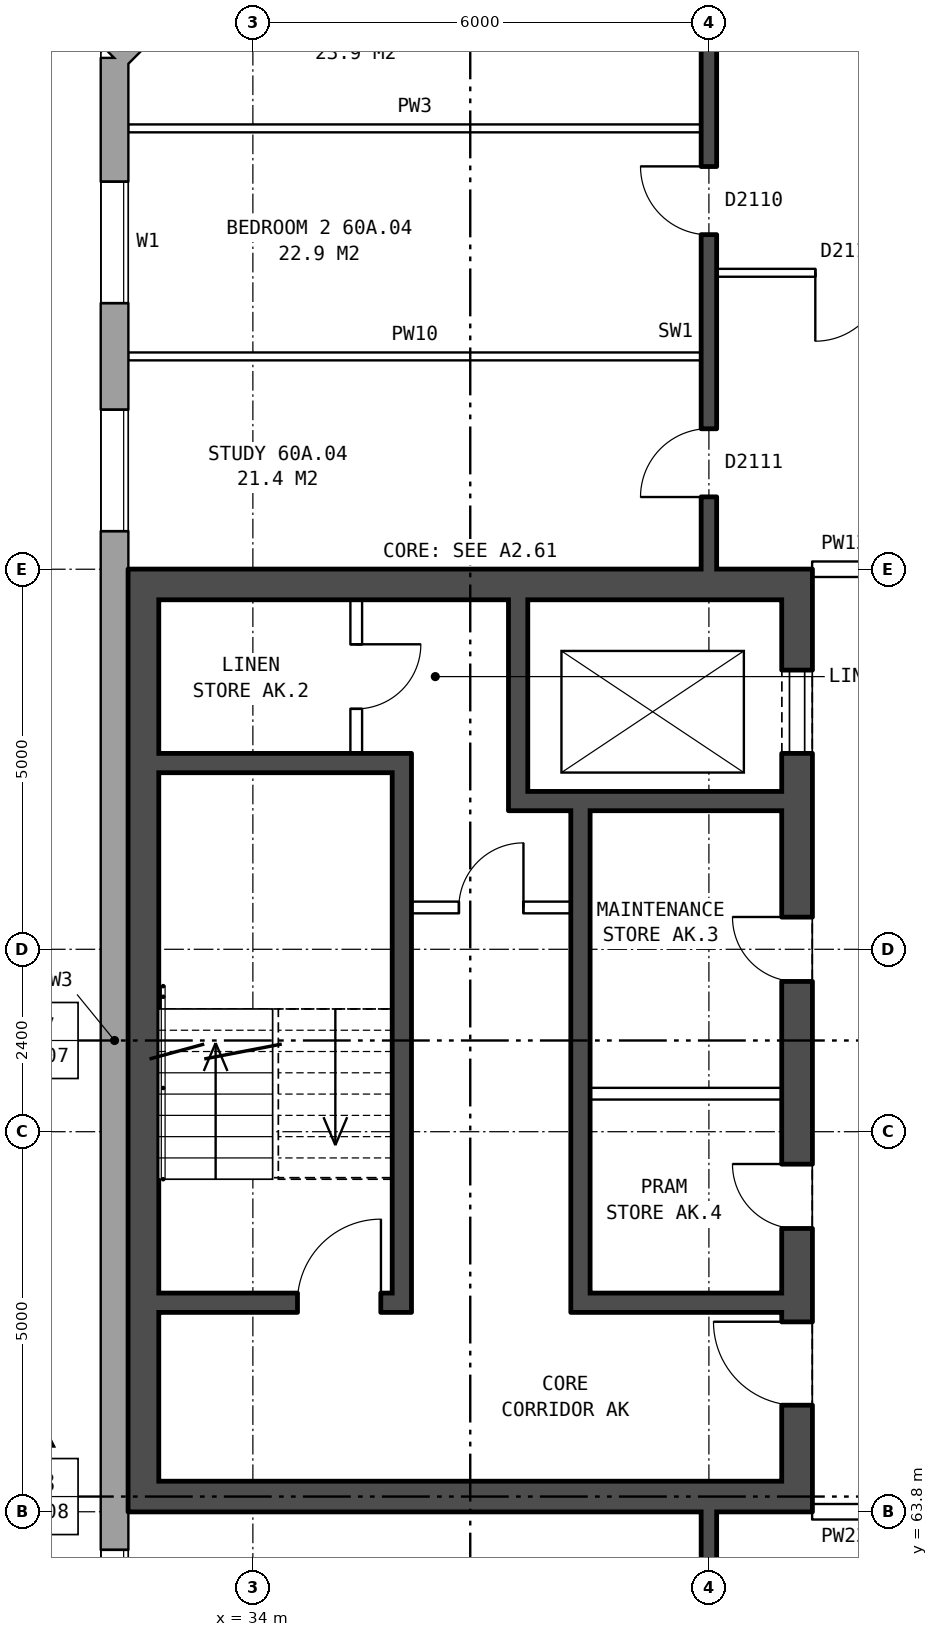
"""IFC4 building model, lengths in metres.
Left out: names, types, materials, properties, quantities, classifications, styles, units other than length and angle.
Written with IfcOpenShell. Run it as: python <this file> out.ifc"""

import sys

from ifc_helpers import new_model, si_unit, direction, frame, frame_2d, origin, place, context, subcontext, project, spatial, rectangle, extrude, element, fill, save


model = new_model("IFC4")
c1 = context("Model", 3, precision=1e-05, world=origin(), true_north=direction((0.0, 1.0)))
c2 = subcontext(c1, "Body", "Model", "MODEL_VIEW")
j1 = project(units=[si_unit("LENGTHUNIT", "METRE"), si_unit("PLANEANGLEUNIT", "RADIAN")], contexts=[c1])
p1 = place(None, origin())
s1 = spatial("IfcSite", under=j1, at=p1, CompositionType="ELEMENT")
p2 = place(p1, origin())
s2 = spatial("IfcBuilding", under=s1, at=p2, CompositionType="ELEMENT")
p3 = place(p2, frame((0.0, 0.0, 212.1)))
s3 = spatial("IfcBuildingStorey", under=s2, at=p3, CompositionType="ELEMENT", Elevation=212.1)
p4 = place(p3, frame((35.075, 85.82, 0.0), z_axis=(0.0, 0.0, 1.0), x_axis=(-0.707106781187, -0.707106781187, 0.0)))
e1 = element("IfcWall", 1, at=p4, inside=s3, PredefinedType="STANDARD", context=c2, shape_type="SweptSolid", body=[
    extrude(rectangle(XDim=4.094, YDim=0.36, at=frame_2d((2.047, 0.0))), origin(), (0.0, 0.0, 1.0), 2.85),
])
p5 = place(p4, frame((1.247, 0.0, 0.8)))
e2 = element("IfcOpeningElement", 2, at=p5, cuts=e1, PredefinedType="OPENING", context=c2, shape_type="SweptSolid", body=[
    extrude(rectangle(XDim=1.6, YDim=1.8, at=frame_2d((0.8, 0.9))), frame((0.0, 0.19, 0.0), z_axis=(0.0, -1.0, 0.0), x_axis=(1.0, 0.0, 0.0)), (0.0, 0.0, 1.0), 0.38),
])
p6 = place(p3, frame((32.18, 82.925, 0.0), z_axis=(0.0, 0.0, 1.0), x_axis=(0.0, -1.0, 0.0)))
e3 = element("IfcWall", 3, at=p6, inside=s3, PredefinedType="STANDARD", context=c2, shape_type="SweptSolid", body=[
    extrude(rectangle(XDim=25.851, YDim=0.36, at=frame_2d((12.925, 0.0))), origin(), (0.0, 0.0, 1.0), 2.85),
])
p7 = place(p6, frame((1.625, 0.0, 0.8)))
e4 = element("IfcOpeningElement", 4, at=p7, cuts=e3, PredefinedType="OPENING", context=c2, shape_type="SweptSolid", body=[
    extrude(rectangle(XDim=1.6, YDim=1.8, at=frame_2d((0.8, 0.9))), frame((0.0, 0.19, 0.0), z_axis=(0.0, -1.0, 0.0), x_axis=(1.0, 0.0, 0.0)), (0.0, 0.0, 1.0), 0.38),
])
p8 = place(p6, frame((4.625, 0.0, 0.8)))
e5 = element("IfcOpeningElement", 5, at=p8, cuts=e3, PredefinedType="OPENING", context=c2, shape_type="SweptSolid", body=[
    extrude(rectangle(XDim=1.6, YDim=1.8, at=frame_2d((0.8, 0.9))), frame((0.0, 0.19, 0.0), z_axis=(0.0, -1.0, 0.0), x_axis=(1.0, 0.0, 0.0)), (0.0, 0.0, 1.0), 0.38),
])
p9 = place(p6, frame((19.625, 0.0, 0.8)))
e6 = element("IfcOpeningElement", 6, at=p9, cuts=e3, PredefinedType="OPENING", context=c2, shape_type="SweptSolid", body=[
    extrude(rectangle(XDim=1.6, YDim=1.8, at=frame_2d((0.8, 0.9))), frame((0.0, 0.19, 0.0), z_axis=(0.0, -1.0, 0.0), x_axis=(1.0, 0.0, 0.0)), (0.0, 0.0, 1.0), 0.38),
])
p10 = place(p6, frame((22.625, 0.0, 0.8)))
e7 = element("IfcOpeningElement", 7, at=p10, cuts=e3, PredefinedType="OPENING", context=c2, shape_type="SweptSolid", body=[
    extrude(rectangle(XDim=1.6, YDim=1.8, at=frame_2d((0.8, 0.9))), frame((0.0, 0.19, 0.0), z_axis=(0.0, -1.0, 0.0), x_axis=(1.0, 0.0, 0.0)), (0.0, 0.0, 1.0), 0.38),
])
p11 = place(p3, frame((41.16, 76.2, 0.0), z_axis=(0.0, 0.0, 1.0), x_axis=(0.0, -1.0, 0.0)))
e8 = element("IfcWall", 8, at=p11, inside=s3, PredefinedType="SHEAR", context=c2, shape_type="SweptSolid", body=[
    extrude(rectangle(XDim=12.4, YDim=0.4, at=frame_2d((6.2, 0.0))), origin(), (0.0, 0.0, 1.0), 2.85),
])
p12 = place(p11, frame((1.325, 0.0, 0.0)))
e9 = element("IfcOpeningElement", 9, at=p12, cuts=e8, PredefinedType="OPENING", context=c2, shape_type="SweptSolid", body=[
    extrude(rectangle(XDim=1.1, YDim=2.1, at=frame_2d((0.55, 1.05))), frame((0.0, 0.21, 0.0), z_axis=(0.0, -1.0, 0.0), x_axis=(1.0, 0.0, 0.0)), (0.0, 0.0, 1.0), 0.42),
])
p13 = place(p11, frame((4.575, 0.0, 0.0)))
e10 = element("IfcOpeningElement", 10, at=p13, cuts=e8, PredefinedType="OPENING", context=c2, shape_type="SweptSolid", body=[
    extrude(rectangle(XDim=0.85, YDim=2.1, at=frame_2d((0.425, 1.05))), frame((0.0, 0.21, 0.0), z_axis=(0.0, -1.0, 0.0), x_axis=(1.0, 0.0, 0.0)), (0.0, 0.0, 1.0), 0.42),
])
p14 = place(p11, frame((7.825, 0.0, 0.0)))
e11 = element("IfcOpeningElement", 11, at=p14, cuts=e8, PredefinedType="OPENING", context=c2, shape_type="SweptSolid", body=[
    extrude(rectangle(XDim=0.85, YDim=2.1, at=frame_2d((0.425, 1.05))), frame((0.0, 0.21, 0.0), z_axis=(0.0, -1.0, 0.0), x_axis=(1.0, 0.0, 0.0)), (0.0, 0.0, 1.0), 0.42),
])
p15 = place(p11, frame((9.9, 0.0, 0.0)))
e12 = element("IfcOpeningElement", 12, at=p15, cuts=e8, PredefinedType="OPENING", context=c2, shape_type="SweptSolid", body=[
    extrude(rectangle(XDim=1.1, YDim=2.1, at=frame_2d((0.55, 1.05))), frame((0.0, 0.21, 0.0), z_axis=(0.0, -1.0, 0.0), x_axis=(1.0, 0.0, 0.0)), (0.0, 0.0, 1.0), 0.42),
])
p16 = place(p3, frame((32.56, 76.2, 0.0), z_axis=(0.0, 0.0, 1.0), x_axis=(0.0, -1.0, 0.0)))
e13 = element("IfcWall", 13, at=p16, inside=s3, PredefinedType="SHEAR", context=c2, shape_type="SweptSolid", body=[
    extrude(rectangle(XDim=12.4, YDim=0.4, at=frame_2d((6.2, 0.0))), origin(), (0.0, 0.0, 1.0), 2.85),
])
for number, where, z_axis, x_axis in (
    (14, (40.96, 76.0, 0.0), (0.0, 0.0, 1.0), (-1.0, 0.0, 0.0)),
    (15, (40.96, 64.0, 0.0), (0.0, 0.0, 1.0), (-1.0, 0.0, 0.0)),
):
    element("IfcWall", number, at=place(p3, frame(where, z_axis=z_axis, x_axis=x_axis)), inside=s3, PredefinedType="SHEAR", context=c2, shape_type="SweptSolid", body=[
        extrude(rectangle(XDim=8.2, YDim=0.4, at=frame_2d((4.1, 0.0))), origin(), (0.0, 0.0, 1.0), 2.85),
    ])
p17 = place(p3, frame((35.835, 73.65, 0.0), z_axis=(0.0, 0.0, 1.0), x_axis=(-1.0, 0.0, 0.0)))
e16 = element("IfcWall", 16, at=p17, inside=s3, PredefinedType="SHEAR", context=c2, shape_type="SweptSolid", body=[
    extrude(rectangle(XDim=3.075, YDim=0.25, at=frame_2d((1.538, 0.0))), origin(), (0.0, 0.0, 1.0), 2.85),
])
p18 = place(p3, frame((40.96, 73.15, 0.0), z_axis=(0.0, 0.0, 1.0), x_axis=(-1.0, 0.0, 0.0)))
e17 = element("IfcWall", 17, at=p18, inside=s3, PredefinedType="SHEAR", context=c2, shape_type="SweptSolid", body=[
    extrude(rectangle(XDim=3.595, YDim=0.25, at=frame_2d((1.797, 0.0))), origin(), (0.0, 0.0, 1.0), 2.85),
])
p19 = place(p3, frame((38.185, 71.75, 0.0), z_axis=(0.0, 0.0, 1.0), x_axis=(-1.0, 0.0, 0.0)))
e18 = element("IfcWall", 18, at=p19, inside=s3, PredefinedType="PARTITIONING", context=c2, shape_type="SweptSolid", body=[
    extrude(rectangle(XDim=2.1, YDim=0.15, at=frame_2d((1.05, 0.0))), origin(), (0.0, 0.0, 1.0), 2.85),
])
p20 = place(p19, frame((0.625, 0.0, 0.0)))
e19 = element("IfcOpeningElement", 19, at=p20, cuts=e18, PredefinedType="OPENING", context=c2, shape_type="SweptSolid", body=[
    extrude(rectangle(XDim=0.85, YDim=2.1, at=frame_2d((0.425, 1.05))), frame((0.0, 0.085, 0.0), z_axis=(0.0, -1.0, 0.0), x_axis=(1.0, 0.0, 0.0)), (0.0, 0.0, 1.0), 0.17),
])
p21 = place(p3, frame((40.96, 69.3, 0.0), z_axis=(0.0, 0.0, 1.0), x_axis=(-1.0, 0.0, 0.0)))
e20 = element("IfcWall", 20, at=p21, inside=s3, PredefinedType="PARTITIONING", context=c2, shape_type="SweptSolid", body=[
    extrude(rectangle(XDim=2.525, YDim=0.15, at=frame_2d((1.262, 0.0))), origin(), (0.0, 0.0, 1.0), 2.85),
])
p22 = place(p3, frame((40.96, 66.55, 0.0), z_axis=(0.0, 0.0, 1.0), x_axis=(-1.0, 0.0, 0.0)))
e21 = element("IfcWall", 21, at=p22, inside=s3, PredefinedType="SHEAR", context=c2, shape_type="SweptSolid", body=[
    extrude(rectangle(XDim=2.525, YDim=0.25, at=frame_2d((1.262, 0.0))), origin(), (0.0, 0.0, 1.0), 2.85),
])
p23 = place(p3, frame((35.835, 66.55, 0.0), z_axis=(0.0, 0.0, 1.0), x_axis=(-1.0, 0.0, 0.0)))
e22 = element("IfcWall", 22, at=p23, inside=s3, PredefinedType="SHEAR", context=c2, shape_type="SweptSolid", body=[
    extrude(rectangle(XDim=3.075, YDim=0.25, at=frame_2d((1.538, 0.0))), origin(), (0.0, 0.0, 1.0), 2.85),
])
p24 = place(p23, frame((0.15, 0.0, 0.0)))
e23 = element("IfcOpeningElement", 23, at=p24, cuts=e22, PredefinedType="OPENING", context=c2, shape_type="SweptSolid", body=[
    extrude(rectangle(XDim=1.1, YDim=2.1, at=frame_2d((0.55, 1.05))), frame((0.0, 0.135, 0.0), z_axis=(0.0, -1.0, 0.0), x_axis=(1.0, 0.0, 0.0)), (0.0, 0.0, 1.0), 0.27),
])
p25 = place(p3, frame((38.31, 73.025, 0.0), z_axis=(0.0, 0.0, 1.0), x_axis=(0.0, -1.0, 0.0)))
e24 = element("IfcWall", 24, at=p25, inside=s3, PredefinedType="SHEAR", context=c2, shape_type="SweptSolid", body=[
    extrude(rectangle(XDim=6.6, YDim=0.25, at=frame_2d((3.3, 0.0))), origin(), (0.0, 0.0, 1.0), 2.85),
])
p26 = place(p3, frame((37.49, 75.8, 0.0), z_axis=(0.0, 0.0, 1.0), x_axis=(0.0, -1.0, 0.0)))
e25 = element("IfcWall", 25, at=p26, inside=s3, PredefinedType="SHEAR", context=c2, shape_type="SweptSolid", body=[
    extrude(rectangle(XDim=2.525, YDim=0.25, at=frame_2d((1.263, 0.0))), origin(), (0.0, 0.0, 1.0), 2.85),
])
p27 = place(p3, frame((35.96, 73.775, 0.0), z_axis=(0.0, 0.0, 1.0), x_axis=(0.0, -1.0, 0.0)))
e26 = element("IfcWall", 26, at=p27, inside=s3, PredefinedType="SHEAR", context=c2, shape_type="SweptSolid", body=[
    extrude(rectangle(XDim=7.35, YDim=0.25, at=frame_2d((3.675, 0.0))), origin(), (0.0, 0.0, 1.0), 2.85),
])
p28 = place(p3, frame((35.36, 75.8, 0.0), z_axis=(0.0, 0.0, 1.0), x_axis=(0.0, -1.0, 0.0)))
e27 = element("IfcWall", 27, at=p28, inside=s3, PredefinedType="PARTITIONING", context=c2, shape_type="SweptSolid", body=[
    extrude(rectangle(XDim=2.025, YDim=0.15, at=frame_2d((1.013, 0.0))), origin(), (0.0, 0.0, 1.0), 2.85),
])
p29 = place(p28, frame((0.587, 0.0, 0.0)))
e28 = element("IfcOpeningElement", 28, at=p29, cuts=e27, PredefinedType="OPENING", context=c2, shape_type="SweptSolid", body=[
    extrude(rectangle(XDim=0.85, YDim=2.1, at=frame_2d((0.425, 1.05))), frame((0.0, 0.085, 0.0), z_axis=(0.0, -1.0, 0.0), x_axis=(1.0, 0.0, 0.0)), (0.0, 0.0, 1.0), 0.17),
])
p30 = place(p3, frame((41.36, 63.8, 0.0), z_axis=(0.0, 0.0, 1.0), x_axis=(1.0, 0.0, 0.0)))
e29 = element("IfcWall", 29, at=p30, inside=s3, PredefinedType="PARTITIONING", context=c2, shape_type="SweptSolid", body=[
    extrude(rectangle(XDim=3.0, YDim=0.2, at=frame_2d((1.5, 0.0))), origin(), (0.0, 0.0, 1.0), 2.85),
])
p31 = place(p30, frame((1.0, 0.0, 0.0)))
e30 = element("IfcOpeningElement", 30, at=p31, cuts=e29, PredefinedType="OPENING", context=c2, shape_type="SweptSolid", body=[
    extrude(rectangle(XDim=1.0, YDim=2.1, at=frame_2d((0.5, 1.05))), frame((0.0, 0.11, 0.0), z_axis=(0.0, -1.0, 0.0), x_axis=(1.0, 0.0, 0.0)), (0.0, 0.0, 1.0), 0.22),
])
p32 = place(p3, frame((41.36, 76.2, 0.0), z_axis=(0.0, 0.0, 1.0), x_axis=(1.0, 0.0, 0.0)))
e31 = element("IfcWall", 31, at=p32, inside=s3, PredefinedType="PARTITIONING", context=c2, shape_type="SweptSolid", body=[
    extrude(rectangle(XDim=3.0, YDim=0.2, at=frame_2d((1.5, 0.0))), origin(), (0.0, 0.0, 1.0), 2.85),
])
p33 = place(p32, frame((1.0, 0.0, 0.0)))
e32 = element("IfcOpeningElement", 32, at=p33, cuts=e31, PredefinedType="OPENING", context=c2, shape_type="SweptSolid", body=[
    extrude(rectangle(XDim=1.0, YDim=2.1, at=frame_2d((0.5, 1.05))), frame((0.0, 0.11, 0.0), z_axis=(0.0, -1.0, 0.0), x_axis=(1.0, 0.0, 0.0)), (0.0, 0.0, 1.0), 0.22),
])
p34 = place(p3, frame((32.36, 79.0, 0.0), z_axis=(0.0, 0.0, 1.0), x_axis=(1.0, 0.0, 0.0)))
e33 = element("IfcWall", 33, at=p34, inside=s3, PredefinedType="PARTITIONING", context=c2, shape_type="SweptSolid", body=[
    extrude(rectangle(XDim=7.54, YDim=0.1, at=frame_2d((3.77, 0.0))), origin(), (0.0, 0.0, 1.0), 2.85),
])
p35 = place(p3, frame((40.1, 80.1, 0.0), z_axis=(0.0, 0.0, 1.0), x_axis=(1.0, 0.0, 0.0)))
e34 = element("IfcWall", 34, at=p35, inside=s3, PredefinedType="PARTITIONING", context=c2, shape_type="SweptSolid", body=[
    extrude(rectangle(XDim=5.8, YDim=0.1, at=frame_2d((2.9, 0.0))), origin(), (0.0, 0.0, 1.0), 2.85),
])
p36 = place(p35, frame((1.3, 0.0, 0.0)))
e35 = element("IfcOpeningElement", 35, at=p36, cuts=e34, PredefinedType="OPENING", context=c2, shape_type="SweptSolid", body=[
    extrude(rectangle(XDim=0.9, YDim=2.1, at=frame_2d((0.45, 1.05))), frame((0.0, 0.06, 0.0), z_axis=(0.0, -1.0, 0.0), x_axis=(1.0, 0.0, 0.0)), (0.0, 0.0, 1.0), 0.12),
])
p37 = place(p35, frame((4.2, 0.0, 0.0)))
e36 = element("IfcOpeningElement", 36, at=p37, cuts=e34, PredefinedType="OPENING", context=c2, shape_type="SweptSolid", body=[
    extrude(rectangle(XDim=0.9, YDim=2.1, at=frame_2d((0.45, 1.05))), frame((0.0, 0.06, 0.0), z_axis=(0.0, -1.0, 0.0), x_axis=(1.0, 0.0, 0.0)), (0.0, 0.0, 1.0), 0.12),
])
p38 = place(p3, frame((32.36, 82.0, 0.0), z_axis=(0.0, 0.0, 1.0), x_axis=(1.0, 0.0, 0.0)))
e37 = element("IfcWall", 37, at=p38, inside=s3, PredefinedType="PARTITIONING", context=c2, shape_type="SweptSolid", body=[
    extrude(rectangle(XDim=7.54, YDim=0.1, at=frame_2d((3.77, 0.0))), origin(), (0.0, 0.0, 1.0), 2.85),
])
p39 = place(p3, frame((40.0, 54.36, 0.0), z_axis=(0.0, 0.0, 1.0), x_axis=(0.0, 1.0, 0.0)))
e38 = element("IfcWall", 38, at=p39, inside=s3, PredefinedType="SOLIDWALL", context=c2, shape_type="SweptSolid", body=[
    extrude(rectangle(XDim=9.44, YDim=0.2, at=frame_2d((4.72, 0.0))), origin(), (0.0, 0.0, 1.0), 2.85),
])
p40 = place(p39, frame((7.19, 0.0, 0.0)))
e39 = element("IfcOpeningElement", 39, at=p40, cuts=e38, PredefinedType="OPENING", context=c2, shape_type="SweptSolid", body=[
    extrude(rectangle(XDim=0.9, YDim=2.1, at=frame_2d((0.45, 1.05))), frame((0.0, 0.11, 0.0), z_axis=(0.0, -1.0, 0.0), x_axis=(1.0, 0.0, 0.0)), (0.0, 0.0, 1.0), 0.22),
])
p41 = place(p3, frame((40.0, 76.2, 0.0), z_axis=(0.0, 0.0, 1.0), x_axis=(0.0, 1.0, 0.0)))
e40 = element("IfcWall", 40, at=p41, inside=s3, PredefinedType="SOLIDWALL", context=c2, shape_type="SweptSolid", body=[
    extrude(rectangle(XDim=9.44, YDim=0.2, at=frame_2d((4.72, 0.0))), origin(), (0.0, 0.0, 1.0), 2.85),
])
p42 = place(p41, frame((7.17, 0.0, 0.0)))
e41 = element("IfcOpeningElement", 41, at=p42, cuts=e40, PredefinedType="OPENING", context=c2, shape_type="SweptSolid", body=[
    extrude(rectangle(XDim=0.9, YDim=2.1, at=frame_2d((0.45, 1.05))), frame((0.0, 0.11, 0.0), z_axis=(0.0, -1.0, 0.0), x_axis=(1.0, 0.0, 0.0)), (0.0, 0.0, 1.0), 0.22),
])
p43 = place(p41, frame((4.4, 0.0, 0.0)))
e42 = element("IfcOpeningElement", 42, at=p43, cuts=e40, PredefinedType="OPENING", context=c2, shape_type="SweptSolid", body=[
    extrude(rectangle(XDim=0.9, YDim=2.1, at=frame_2d((0.45, 1.05))), frame((0.0, 0.11, 0.0), z_axis=(0.0, -1.0, 0.0), x_axis=(1.0, 0.0, 0.0)), (0.0, 0.0, 1.0), 0.22),
])
p44 = place(p41, frame((0.95, 0.0, 0.0)))
e43 = element("IfcOpeningElement", 43, at=p44, cuts=e40, PredefinedType="OPENING", context=c2, shape_type="SweptSolid", body=[
    extrude(rectangle(XDim=0.9, YDim=2.1, at=frame_2d((0.45, 1.05))), frame((0.0, 0.11, 0.0), z_axis=(0.0, -1.0, 0.0), x_axis=(1.0, 0.0, 0.0)), (0.0, 0.0, 1.0), 0.22),
])
p45 = place(p7, origin())
e44 = element("IfcWindow", 44, at=p45, inside=s3, PartitioningType="SINGLE_PANEL", PredefinedType="WINDOW", context=c2, shape_type="SweptSolid", body=[
    extrude(rectangle(XDim=1.6, YDim=1.8, at=frame_2d((0.8, 0.9))), frame((0.0, 0.15, 0.0), z_axis=(0.0, -1.0, 0.0), x_axis=(1.0, 0.0, 0.0)), (0.0, 0.0, 1.0), 0.06),
])
fill(e4, e44)
p46 = place(p8, origin())
e45 = element("IfcWindow", 45, at=p46, inside=s3, PartitioningType="SINGLE_PANEL", PredefinedType="WINDOW", context=c2, shape_type="SweptSolid", body=[
    extrude(rectangle(XDim=1.6, YDim=1.8, at=frame_2d((0.8, 0.9))), frame((0.0, 0.15, 0.0), z_axis=(0.0, -1.0, 0.0), x_axis=(1.0, 0.0, 0.0)), (0.0, 0.0, 1.0), 0.06),
])
fill(e5, e45)
p47 = place(p9, origin())
e46 = element("IfcWindow", 46, at=p47, inside=s3, PartitioningType="SINGLE_PANEL", PredefinedType="WINDOW", context=c2, shape_type="SweptSolid", body=[
    extrude(rectangle(XDim=1.6, YDim=1.8, at=frame_2d((0.8, 0.9))), frame((0.0, 0.15, 0.0), z_axis=(0.0, -1.0, 0.0), x_axis=(1.0, 0.0, 0.0)), (0.0, 0.0, 1.0), 0.06),
])
fill(e6, e46)
p48 = place(p12, origin())
e47 = element("IfcDoor", 47, at=p48, inside=s3, OperationType="DOUBLE_DOOR_SLIDING", PredefinedType="DOOR", context=c2, shape_type="SweptSolid", body=[
    extrude(rectangle(XDim=1.1, YDim=2.1, at=frame_2d((0.55, 1.05))), frame((0.0, -0.135, 0.0), z_axis=(0.0, -1.0, 0.0), x_axis=(1.0, 0.0, 0.0)), (0.0, 0.0, 1.0), 0.05),
])
fill(e9, e47)
p49 = place(p13, frame((0.85, 0.0, 0.0), z_axis=(0.0, 0.0, 1.0), x_axis=(-1.0, 0.0, 0.0)))
e48 = element("IfcDoor", 48, at=p49, inside=s3, OperationType="SINGLE_SWING_RIGHT", PredefinedType="DOOR", context=c2, shape_type="SweptSolid", body=[
    extrude(rectangle(XDim=0.85, YDim=2.1, at=frame_2d((0.425, 1.05))), frame((0.0, 0.185, 0.0), z_axis=(0.0, -1.0, 0.0), x_axis=(1.0, 0.0, 0.0)), (0.0, 0.0, 1.0), 0.05),
])
fill(e10, e48)
p50 = place(p14, frame((0.85, 0.0, 0.0), z_axis=(0.0, 0.0, 1.0), x_axis=(-1.0, 0.0, 0.0)))
e49 = element("IfcDoor", 49, at=p50, inside=s3, OperationType="SINGLE_SWING_RIGHT", PredefinedType="DOOR", context=c2, shape_type="SweptSolid", body=[
    extrude(rectangle(XDim=0.85, YDim=2.1, at=frame_2d((0.425, 1.05))), frame((0.0, 0.185, 0.0), z_axis=(0.0, -1.0, 0.0), x_axis=(1.0, 0.0, 0.0)), (0.0, 0.0, 1.0), 0.05),
])
fill(e11, e49)
p51 = place(p15, frame((1.1, 0.0, 0.0), z_axis=(0.0, 0.0, 1.0), x_axis=(-1.0, 0.0, 0.0)))
e50 = element("IfcDoor", 50, at=p51, inside=s3, OperationType="SINGLE_SWING_RIGHT", PredefinedType="DOOR", context=c2, shape_type="SweptSolid", body=[
    extrude(rectangle(XDim=1.1, YDim=2.1, at=frame_2d((0.55, 1.05))), frame((0.0, 0.185, 0.0), z_axis=(0.0, -1.0, 0.0), x_axis=(1.0, 0.0, 0.0)), (0.0, 0.0, 1.0), 0.05),
])
fill(e12, e50)
p52 = place(p24, frame((1.1, 0.0, 0.0), z_axis=(0.0, 0.0, 1.0), x_axis=(-1.0, 0.0, 0.0)))
e51 = element("IfcDoor", 51, at=p52, inside=s3, OperationType="SINGLE_SWING_RIGHT", PredefinedType="DOOR", context=c2, shape_type="SweptSolid", body=[
    extrude(rectangle(XDim=1.1, YDim=2.1, at=frame_2d((0.55, 1.05))), frame((0.0, 0.025, 0.0), z_axis=(0.0, -1.0, 0.0), x_axis=(1.0, 0.0, 0.0)), (0.0, 0.0, 1.0), 0.05),
])
fill(e23, e51)
p53 = place(p20, frame((0.85, 0.0, 0.0), z_axis=(0.0, 0.0, 1.0), x_axis=(-1.0, 0.0, 0.0)))
e52 = element("IfcDoor", 52, at=p53, inside=s3, OperationType="SINGLE_SWING_RIGHT", PredefinedType="DOOR", context=c2, shape_type="SweptSolid", body=[
    extrude(rectangle(XDim=0.85, YDim=2.1, at=frame_2d((0.425, 1.05))), frame((0.0, 0.025, 0.0), z_axis=(0.0, -1.0, 0.0), x_axis=(1.0, 0.0, 0.0)), (0.0, 0.0, 1.0), 0.05),
])
fill(e19, e52)
p54 = place(p29, origin())
e53 = element("IfcDoor", 53, at=p54, inside=s3, OperationType="SINGLE_SWING_LEFT", PredefinedType="DOOR", context=c2, shape_type="SweptSolid", body=[
    extrude(rectangle(XDim=0.85, YDim=2.1, at=frame_2d((0.425, 1.05))), frame((0.0, 0.025, 0.0), z_axis=(0.0, -1.0, 0.0), x_axis=(1.0, 0.0, 0.0)), (0.0, 0.0, 1.0), 0.05),
])
fill(e28, e53)
p55 = place(p43, origin())
e54 = element("IfcDoor", 54, at=p55, inside=s3, OperationType="SINGLE_SWING_RIGHT", PredefinedType="DOOR", context=c2, shape_type="SweptSolid", body=[
    extrude(rectangle(XDim=0.9, YDim=2.1, at=frame_2d((0.45, 1.05))), frame((0.0, 0.025, 0.0), z_axis=(0.0, -1.0, 0.0), x_axis=(1.0, 0.0, 0.0)), (0.0, 0.0, 1.0), 0.05),
])
fill(e42, e54)
p56 = place(p44, origin())
e55 = element("IfcDoor", 55, at=p56, inside=s3, OperationType="SINGLE_SWING_LEFT", PredefinedType="DOOR", context=c2, shape_type="SweptSolid", body=[
    extrude(rectangle(XDim=0.9, YDim=2.1, at=frame_2d((0.45, 1.05))), frame((0.0, 0.025, 0.0), z_axis=(0.0, -1.0, 0.0), x_axis=(1.0, 0.0, 0.0)), (0.0, 0.0, 1.0), 0.05),
])
fill(e43, e55)
p57 = place(p36, frame((0.9, 0.0, 0.0), z_axis=(0.0, 0.0, 1.0), x_axis=(-1.0, 0.0, 0.0)))
e56 = element("IfcDoor", 56, at=p57, inside=s3, OperationType="SINGLE_SWING_RIGHT", PredefinedType="DOOR", context=c2, shape_type="SweptSolid", body=[
    extrude(rectangle(XDim=0.9, YDim=2.1, at=frame_2d((0.45, 1.05))), frame((0.0, 0.025, 0.0), z_axis=(0.0, -1.0, 0.0), x_axis=(1.0, 0.0, 0.0)), (0.0, 0.0, 1.0), 0.05),
])
fill(e35, e56)
save(model, sys.argv[1])
